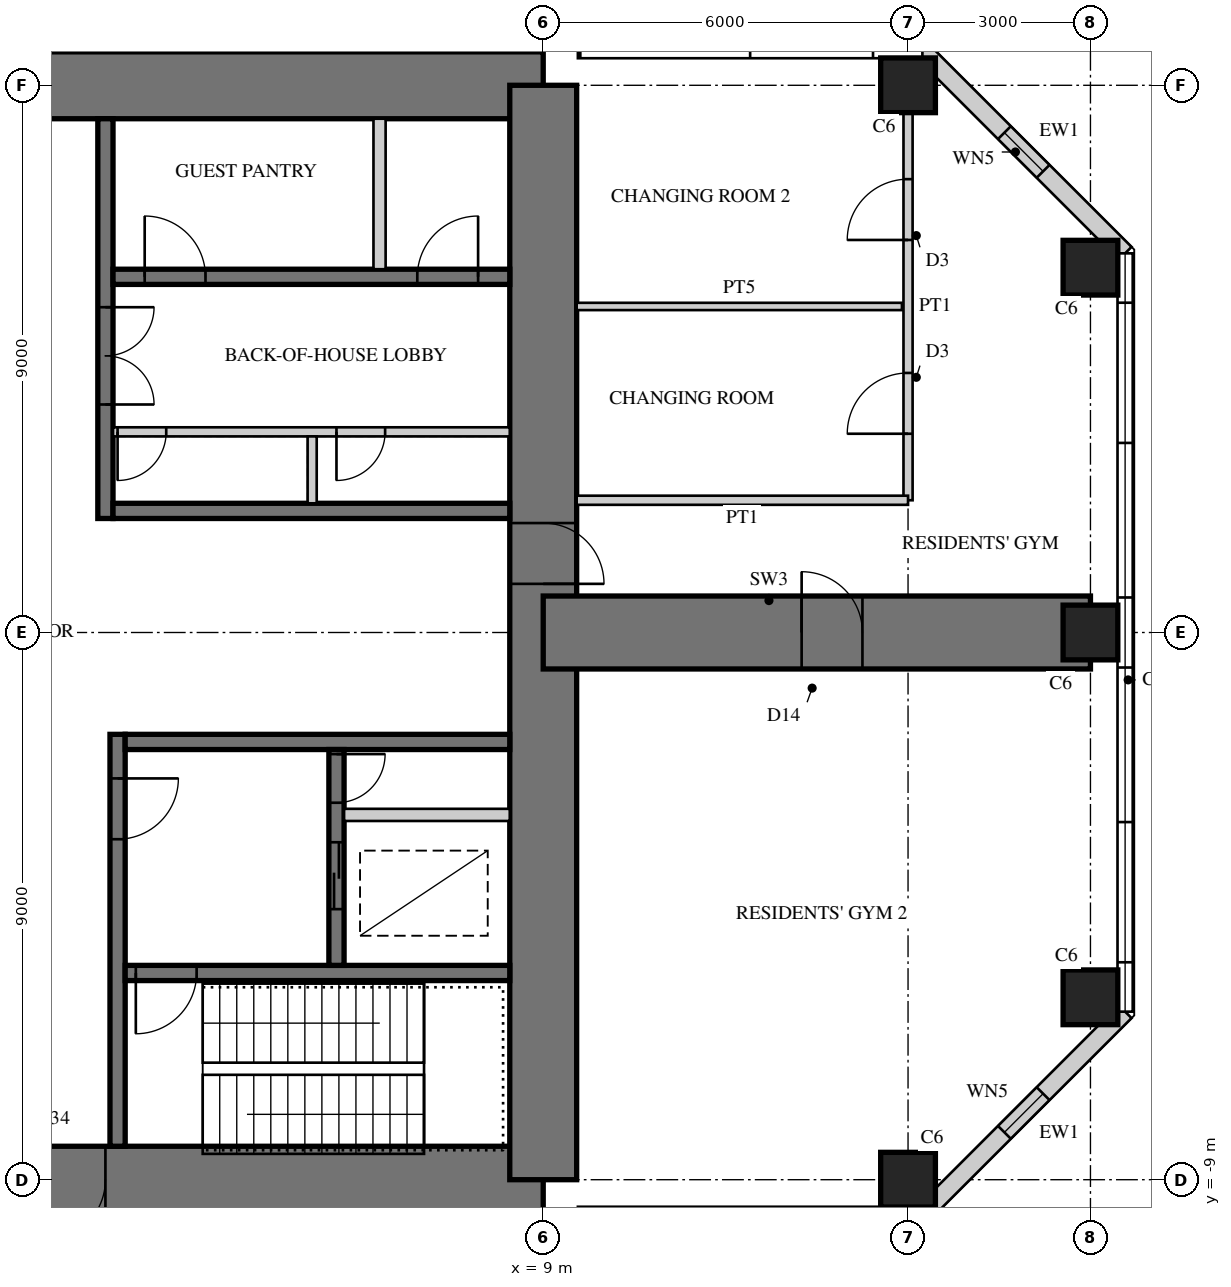
"""IFC4 building model, lengths in metres.
Left out: names, types, materials, properties, quantities, classifications, styles, units other than length and angle.
Written with IfcOpenShell. Run it as: python <this file> out.ifc"""

import sys

from ifc_helpers import new_model, si_unit, direction, frame, frame_2d, origin, origin_2d, place, context, subcontext, project, spatial, rectangle, hollow_rectangle, extrude, element, fill, save


model = new_model("IFC4")
c1 = context("Model", 3, precision=1e-05, world=origin(), true_north=direction((0.0, 1.0)))
c2 = subcontext(c1, "Body", "Model", "MODEL_VIEW")
j1 = project(units=[si_unit("LENGTHUNIT", "METRE"), si_unit("PLANEANGLEUNIT", "RADIAN")], contexts=[c1])
p1 = place(None, origin())
s1 = spatial("IfcSite", under=j1, at=p1, CompositionType="ELEMENT")
p2 = place(p1, origin())
s2 = spatial("IfcBuilding", under=s1, at=p2, CompositionType="ELEMENT")
p3 = place(p2, frame((0.0, 0.0, 217.1)))
s3 = spatial("IfcBuildingStorey", under=s2, at=p3, CompositionType="ELEMENT", Elevation=217.1)
p4 = place(p3, frame((9.0, 9.0, 0.0), z_axis=(0.0, 0.0, 1.0), x_axis=(-1.0, 0.0, 0.0)))
e1 = element("IfcWall", 1, at=p4, inside=s3, PredefinedType="SHEAR", context=c2, shape_type="SweptSolid", body=[
    extrude(rectangle(XDim=18.0, YDim=1.1, at=frame_2d((9.0, 0.0))), origin(), (0.0, 0.0, 1.0), 5.0),
])
p5 = place(p4, frame((9.8, 0.0, 0.0)))
e2 = element("IfcOpeningElement", 2, at=p5, cuts=e1, PredefinedType="OPENING", context=c2, shape_type="SweptSolid", body=[
    extrude(rectangle(XDim=1.0, YDim=2.4, at=frame_2d((0.5, 1.2))), frame((0.0, 0.56, 0.0), z_axis=(0.0, -1.0, 0.0), x_axis=(1.0, 0.0, 0.0)), (0.0, 0.0, 1.0), 1.12),
])
p6 = place(p3, frame((-9.0, -9.0, 0.0), z_axis=(0.0, 0.0, 1.0), x_axis=(1.0, 0.0, 0.0)))
e3 = element("IfcWall", 3, at=p6, inside=s3, PredefinedType="SHEAR", context=c2, shape_type="SweptSolid", body=[
    extrude(rectangle(XDim=18.0, YDim=1.1, at=frame_2d((9.0, 0.0))), origin(), (0.0, 0.0, 1.0), 5.0),
])
p7 = place(p6, frame((9.8, 0.0, 0.0)))
e4 = element("IfcOpeningElement", 4, at=p7, cuts=e3, PredefinedType="OPENING", context=c2, shape_type="SweptSolid", body=[
    extrude(rectangle(XDim=1.0, YDim=2.4, at=frame_2d((0.5, 1.2))), frame((0.0, 0.56, 0.0), z_axis=(0.0, -1.0, 0.0), x_axis=(1.0, 0.0, 0.0)), (0.0, 0.0, 1.0), 1.12),
])
p8 = place(p3, frame((9.0, -9.0, 0.0), z_axis=(0.0, 0.0, 1.0), x_axis=(0.0, 1.0, 0.0)))
e5 = element("IfcWall", 5, at=p8, inside=s3, PredefinedType="SHEAR", context=c2, shape_type="SweptSolid", body=[
    extrude(rectangle(XDim=18.0, YDim=1.1, at=frame_2d((9.0, 0.0))), origin(), (0.0, 0.0, 1.0), 5.0),
])
p9 = place(p8, frame((9.8, 0.0, 0.0)))
e6 = element("IfcOpeningElement", 6, at=p9, cuts=e5, PredefinedType="OPENING", context=c2, shape_type="SweptSolid", body=[
    extrude(rectangle(XDim=1.0, YDim=2.4, at=frame_2d((0.5, 1.2))), frame((0.0, 0.56, 0.0), z_axis=(0.0, -1.0, 0.0), x_axis=(1.0, 0.0, 0.0)), (0.0, 0.0, 1.0), 1.12),
])
p10 = place(p3, frame((1.8, 1.875, 0.0), z_axis=(0.0, 0.0, 1.0), x_axis=(0.0, 1.0, 0.0)))
e7 = element("IfcWall", 7, at=p10, inside=s3, PredefinedType="SHEAR", context=c2, shape_type="SweptSolid", body=[
    extrude(rectangle(XDim=6.575, YDim=0.25, at=frame_2d((3.288, 0.0))), origin(), (0.0, 0.0, 1.0), 5.0),
])
p11 = place(p10, frame((1.875, 0.0, 0.0)))
e8 = element("IfcOpeningElement", 8, at=p11, cuts=e7, PredefinedType="OPENING", context=c2, shape_type="SweptSolid", body=[
    extrude(rectangle(XDim=1.6, YDim=2.4, at=frame_2d((0.8, 1.2))), frame((0.0, 0.135, 0.0), z_axis=(0.0, -1.0, 0.0), x_axis=(1.0, 0.0, 0.0)), (0.0, 0.0, 1.0), 0.27),
])
p12 = place(p3, frame((1.925, 2.0, 0.0), z_axis=(0.0, 0.0, 1.0), x_axis=(1.0, 0.0, 0.0)))
e9 = element("IfcWall", 9, at=p12, inside=s3, PredefinedType="SHEAR", context=c2, shape_type="SweptSolid", body=[
    extrude(rectangle(XDim=6.525, YDim=0.25, at=frame_2d((3.262, 0.0))), origin(), (0.0, 0.0, 1.0), 5.0),
])
p13 = place(p3, frame((1.925, 5.85, 0.0), z_axis=(0.0, 0.0, 1.0), x_axis=(1.0, 0.0, 0.0)))
e10 = element("IfcWall", 10, at=p13, inside=s3, PredefinedType="SHEAR", context=c2, shape_type="SweptSolid", body=[
    extrude(rectangle(XDim=6.525, YDim=0.25, at=frame_2d((3.262, 0.0))), origin(), (0.0, 0.0, 1.0), 5.0),
])
p14 = place(p13, frame((0.521, 0.0, 0.0)))
e11 = element("IfcOpeningElement", 11, at=p14, cuts=e10, PredefinedType="OPENING", context=c2, shape_type="SweptSolid", body=[
    extrude(rectangle(XDim=1.0, YDim=2.1, at=frame_2d((0.5, 1.05))), frame((0.0, 0.135, 0.0), z_axis=(0.0, -1.0, 0.0), x_axis=(1.0, 0.0, 0.0)), (0.0, 0.0, 1.0), 0.27),
])
p15 = place(p13, frame((5.004, 0.0, 0.0)))
e12 = element("IfcOpeningElement", 12, at=p15, cuts=e10, PredefinedType="OPENING", context=c2, shape_type="SweptSolid", body=[
    extrude(rectangle(XDim=1.0, YDim=2.1, at=frame_2d((0.5, 1.05))), frame((0.0, 0.135, 0.0), z_axis=(0.0, -1.0, 0.0), x_axis=(1.0, 0.0, 0.0)), (0.0, 0.0, 1.0), 0.27),
])
p16 = place(p3, frame((1.925, 3.3, 0.0), z_axis=(0.0, 0.0, 1.0), x_axis=(1.0, 0.0, 0.0)))
e13 = element("IfcWall", 13, at=p16, inside=s3, PredefinedType="PARTITIONING", context=c2, shape_type="SweptSolid", body=[
    extrude(rectangle(XDim=6.525, YDim=0.15, at=frame_2d((3.262, 0.0))), origin(), (0.0, 0.0, 1.0), 5.0),
])
p17 = place(p16, frame((0.075, 0.0, 0.0)))
e14 = element("IfcOpeningElement", 14, at=p17, cuts=e13, PredefinedType="OPENING", context=c2, shape_type="SweptSolid", body=[
    extrude(rectangle(XDim=0.8, YDim=2.1, at=frame_2d((0.4, 1.05))), frame((0.0, 0.085, 0.0), z_axis=(0.0, -1.0, 0.0), x_axis=(1.0, 0.0, 0.0)), (0.0, 0.0, 1.0), 0.17),
])
p18 = place(p16, frame((3.675, 0.0, 0.0)))
e15 = element("IfcOpeningElement", 15, at=p18, cuts=e13, PredefinedType="OPENING", context=c2, shape_type="SweptSolid", body=[
    extrude(rectangle(XDim=0.8, YDim=2.1, at=frame_2d((0.4, 1.05))), frame((0.0, 0.085, 0.0), z_axis=(0.0, -1.0, 0.0), x_axis=(1.0, 0.0, 0.0)), (0.0, 0.0, 1.0), 0.17),
])
p19 = place(p3, frame((5.2, 2.125, 0.0), z_axis=(0.0, 0.0, 1.0), x_axis=(0.0, 1.0, 0.0)))
e16 = element("IfcWall", 16, at=p19, inside=s3, PredefinedType="PARTITIONING", context=c2, shape_type="SweptSolid", body=[
    extrude(rectangle(XDim=1.1, YDim=0.15, at=frame_2d((0.55, 0.0))), origin(), (0.0, 0.0, 1.0), 5.0),
])
p20 = place(p3, frame((6.308, 5.975, 0.0), z_axis=(0.0, 0.0, 1.0), x_axis=(0.0, 1.0, 0.0)))
e17 = element("IfcWall", 17, at=p20, inside=s3, PredefinedType="PARTITIONING", context=c2, shape_type="SweptSolid", body=[
    extrude(rectangle(XDim=2.475, YDim=0.2, at=frame_2d((1.237, 0.0))), origin(), (0.0, 0.0, 1.0), 5.0),
])
p21 = place(p3, frame((2.0, -1.675, 0.0), z_axis=(0.0, 0.0, 1.0), x_axis=(0.0, -1.0, 0.0)))
e18 = element("IfcWall", 18, at=p21, inside=s3, PredefinedType="SHEAR", context=c2, shape_type="SweptSolid", body=[
    extrude(rectangle(XDim=6.775, YDim=0.25, at=frame_2d((3.387, 0.0))), origin(), (0.0, 0.0, 1.0), 5.0),
])
p22 = place(p21, frame((0.725, 0.0, 0.0)))
e19 = element("IfcOpeningElement", 19, at=p22, cuts=e18, PredefinedType="OPENING", context=c2, shape_type="SweptSolid", body=[
    extrude(rectangle(XDim=1.0, YDim=2.1, at=frame_2d((0.5, 1.05))), frame((0.0, 0.135, 0.0), z_axis=(0.0, -1.0, 0.0), x_axis=(1.0, 0.0, 0.0)), (0.0, 0.0, 1.0), 0.27),
])
p23 = place(p3, frame((2.125, -1.8, 0.0), z_axis=(0.0, 0.0, 1.0), x_axis=(1.0, 0.0, 0.0)))
e20 = element("IfcWall", 20, at=p23, inside=s3, PredefinedType="SHEAR", context=c2, shape_type="SweptSolid", body=[
    extrude(rectangle(XDim=6.325, YDim=0.25, at=frame_2d((3.163, 0.0))), origin(), (0.0, 0.0, 1.0), 5.0),
])
p24 = place(p3, frame((2.125, -5.6, 0.0), z_axis=(0.0, 0.0, 1.0), x_axis=(1.0, 0.0, 0.0)))
e21 = element("IfcWall", 21, at=p24, inside=s3, PredefinedType="SHEAR", context=c2, shape_type="SweptSolid", body=[
    extrude(rectangle(XDim=6.325, YDim=0.25, at=frame_2d((3.163, 0.0))), origin(), (0.0, 0.0, 1.0), 5.0),
])
p25 = place(p24, frame((0.175, 0.0, 0.0)))
e22 = element("IfcOpeningElement", 22, at=p25, cuts=e21, PredefinedType="OPENING", context=c2, shape_type="SweptSolid", body=[
    extrude(rectangle(XDim=1.0, YDim=2.1, at=frame_2d((0.5, 1.05))), frame((0.0, 0.135, 0.0), z_axis=(0.0, -1.0, 0.0), x_axis=(1.0, 0.0, 0.0)), (0.0, 0.0, 1.0), 0.27),
])
p26 = place(p3, frame((5.6, -1.925, 0.0), z_axis=(0.0, 0.0, 1.0), x_axis=(0.0, -1.0, 0.0)))
e23 = element("IfcWall", 23, at=p26, inside=s3, PredefinedType="SHEAR", context=c2, shape_type="SweptSolid", body=[
    extrude(rectangle(XDim=3.55, YDim=0.25, at=frame_2d((1.775, 0.0))), origin(), (0.0, 0.0, 1.0), 5.0),
])
p27 = place(p26, frame((1.525, 0.0, 0.0)))
e24 = element("IfcOpeningElement", 24, at=p27, cuts=e23, PredefinedType="OPENING", context=c2, shape_type="SweptSolid", body=[
    extrude(rectangle(XDim=1.1, YDim=2.2, at=frame_2d((0.55, 1.1))), frame((0.0, 0.135, 0.0), z_axis=(0.0, -1.0, 0.0), x_axis=(1.0, 0.0, 0.0)), (0.0, 0.0, 1.0), 0.27),
])
p28 = place(p26, frame((0.075, 0.0, 0.0)))
e25 = element("IfcOpeningElement", 25, at=p28, cuts=e23, PredefinedType="OPENING", context=c2, shape_type="SweptSolid", body=[
    extrude(rectangle(XDim=0.8, YDim=2.1, at=frame_2d((0.4, 1.05))), frame((0.0, 0.135, 0.0), z_axis=(0.0, -1.0, 0.0), x_axis=(1.0, 0.0, 0.0)), (0.0, 0.0, 1.0), 0.27),
])
p29 = place(p3, frame((5.725, -3.0, 0.0), z_axis=(0.0, 0.0, 1.0), x_axis=(1.0, 0.0, 0.0)))
e26 = element("IfcWall", 26, at=p29, inside=s3, PredefinedType="PARTITIONING", context=c2, shape_type="SweptSolid", body=[
    extrude(rectangle(XDim=2.725, YDim=0.2, at=frame_2d((1.362, 0.0))), origin(), (0.0, 0.0, 1.0), 5.0),
])
p30 = place(p3, frame((9.0, 0.0, 0.0), z_axis=(0.0, 0.0, 1.0), x_axis=(1.0, 0.0, 0.0)))
e27 = element("IfcWall", 27, at=p30, inside=s3, PredefinedType="SHEAR", context=c2, shape_type="SweptSolid", body=[
    extrude(rectangle(XDim=9.0, YDim=1.2, at=frame_2d((4.5, 0.0))), origin(), (0.0, 0.0, 1.0), 5.0),
])
p31 = place(p30, frame((4.25, 0.0, 0.0)))
e28 = element("IfcOpeningElement", 28, at=p31, cuts=e27, PredefinedType="OPENING", context=c2, shape_type="SweptSolid", body=[
    extrude(rectangle(XDim=1.0, YDim=2.2, at=frame_2d((0.5, 1.1))), frame((0.0, 0.61, 0.0), z_axis=(0.0, -1.0, 0.0), x_axis=(1.0, 0.0, 0.0)), (0.0, 0.0, 1.0), 1.22),
])
for number, where, z_axis, x_axis in (
    (29, (15.0, -9.0, 0.0), (0.0, 0.0, 1.0), (1.0, 0.0, 0.0)),
    (30, (15.0, 9.0, 0.0), (0.0, 0.0, 1.0), (1.0, 0.0, 0.0)),
    (31, (18.0, -6.0, 0.0), (0.0, 0.0, 1.0), (1.0, 0.0, 0.0)),
    (32, (18.0, 0.0, 0.0), (0.0, 0.0, 1.0), (1.0, 0.0, 0.0)),
    (33, (18.0, 6.0, 0.0), (0.0, 0.0, 1.0), (1.0, 0.0, 0.0)),
):
    element("IfcColumn", number, at=place(p3, frame(where, z_axis=z_axis, x_axis=x_axis)), inside=s3, PredefinedType="COLUMN", context=c2, shape_type="SweptSolid", body=[
        extrude(rectangle(XDim=0.9, YDim=0.9, at=origin_2d()), origin(), (0.0, 0.0, 1.0), 5.0),
    ])
p32 = place(p3, frame((15.236, -9.57, 0.0), z_axis=(0.0, 0.0, 1.0), x_axis=(0.707106781187, 0.707106781187, 0.0)))
e34 = element("IfcWall", 34, at=p32, inside=s3, PredefinedType="SOLIDWALL", context=c2, shape_type="SweptSolid", body=[
    extrude(rectangle(XDim=4.715, YDim=0.3, at=frame_2d((2.357, 0.0))), origin(), (0.0, 0.0, 1.0), 4.82),
])
p33 = place(p32, frame((1.907, 0.0, 0.3)))
e35 = element("IfcOpeningElement", 35, at=p33, cuts=e34, PredefinedType="OPENING", context=c2, shape_type="SweptSolid", body=[
    extrude(rectangle(XDim=0.9, YDim=2.4, at=frame_2d((0.45, 1.2))), frame((0.0, 0.16, 0.0), z_axis=(0.0, -1.0, 0.0), x_axis=(1.0, 0.0, 0.0)), (0.0, 0.0, 1.0), 0.32),
])
p34 = place(p3, frame((18.57, 6.236, 0.0), z_axis=(0.0, 0.0, 1.0), x_axis=(-0.707106781187, 0.707106781187, 0.0)))
e36 = element("IfcWall", 36, at=p34, inside=s3, PredefinedType="SOLIDWALL", context=c2, shape_type="SweptSolid", body=[
    extrude(rectangle(XDim=4.715, YDim=0.3, at=frame_2d((2.357, 0.0))), origin(), (0.0, 0.0, 1.0), 4.82),
])
p35 = place(p34, frame((1.907, 0.0, 0.3)))
e37 = element("IfcOpeningElement", 37, at=p35, cuts=e36, PredefinedType="OPENING", context=c2, shape_type="SweptSolid", body=[
    extrude(rectangle(XDim=0.9, YDim=2.4, at=frame_2d((0.45, 1.2))), frame((0.0, 0.16, 0.0), z_axis=(0.0, -1.0, 0.0), x_axis=(1.0, 0.0, 0.0)), (0.0, 0.0, 1.0), 0.32),
])
p36 = place(p3, frame((15.0, 2.175, 0.0), z_axis=(0.0, 0.0, 1.0), x_axis=(0.0, 1.0, 0.0)))
e38 = element("IfcWall", 38, at=p36, inside=s3, PredefinedType="PARTITIONING", context=c2, shape_type="SweptSolid", body=[
    extrude(rectangle(XDim=6.375, YDim=0.15, at=frame_2d((3.188, 0.0))), origin(), (0.0, 0.0, 1.0), 4.07),
])
p37 = place(p36, frame((1.094, 0.0, 0.0)))
e39 = element("IfcOpeningElement", 39, at=p37, cuts=e38, PredefinedType="OPENING", context=c2, shape_type="SweptSolid", body=[
    extrude(rectangle(XDim=1.0, YDim=2.1, at=frame_2d((0.5, 1.05))), frame((0.0, 0.085, 0.0), z_axis=(0.0, -1.0, 0.0), x_axis=(1.0, 0.0, 0.0)), (0.0, 0.0, 1.0), 0.17),
])
p38 = place(p36, frame((4.281, 0.0, 0.0)))
e40 = element("IfcOpeningElement", 40, at=p38, cuts=e38, PredefinedType="OPENING", context=c2, shape_type="SweptSolid", body=[
    extrude(rectangle(XDim=1.0, YDim=2.1, at=frame_2d((0.5, 1.05))), frame((0.0, 0.085, 0.0), z_axis=(0.0, -1.0, 0.0), x_axis=(1.0, 0.0, 0.0)), (0.0, 0.0, 1.0), 0.17),
])
p39 = place(p3, frame((9.55, 2.175, 0.0), z_axis=(0.0, 0.0, 1.0), x_axis=(1.0, 0.0, 0.0)))
e41 = element("IfcWall", 41, at=p39, inside=s3, PredefinedType="PARTITIONING", context=c2, shape_type="SweptSolid", body=[
    extrude(rectangle(XDim=5.45, YDim=0.15, at=frame_2d((2.725, 0.0))), origin(), (0.0, 0.0, 1.0), 4.82),
])
p40 = place(p3, frame((9.55, 5.363, 0.0), z_axis=(0.0, 0.0, 1.0), x_axis=(1.0, 0.0, 0.0)))
e42 = element("IfcWall", 42, at=p40, inside=s3, PredefinedType="PLUMBINGWALL", context=c2, shape_type="SweptSolid", body=[
    extrude(rectangle(XDim=5.35, YDim=0.12, at=frame_2d((2.675, 0.0))), origin(), (0.0, 0.0, 1.0), 4.82),
])
p41 = place(p33, origin())
e43 = element("IfcWindow", 43, at=p41, inside=s3, PartitioningType="SINGLE_PANEL", PredefinedType="WINDOW", context=c2, shape_type="SweptSolid", body=[
    extrude(hollow_rectangle(XDim=0.9, YDim=2.4, WallThickness=0.06, at=frame_2d((0.45, 1.2))), frame((0.0, 0.03, 0.0), z_axis=(0.0, -1.0, 0.0), x_axis=(1.0, 0.0, 0.0)), (0.0, 0.0, 1.0), 0.06),
    extrude(rectangle(XDim=0.779, YDim=2.279, at=frame_2d((0.45, 1.2))), frame((0.0, 0.03, 0.0), z_axis=(0.0, -1.0, 0.0), x_axis=(1.0, 0.0, 0.0)), (0.0, 0.0, 1.0), 0.06),
])
fill(e35, e43)
p42 = place(p35, origin())
e44 = element("IfcWindow", 44, at=p42, inside=s3, PartitioningType="SINGLE_PANEL", PredefinedType="WINDOW", context=c2, shape_type="SweptSolid", body=[
    extrude(hollow_rectangle(XDim=0.9, YDim=2.4, WallThickness=0.06, at=frame_2d((0.45, 1.2))), frame((0.0, 0.03, 0.0), z_axis=(0.0, -1.0, 0.0), x_axis=(1.0, 0.0, 0.0)), (0.0, 0.0, 1.0), 0.06),
    extrude(rectangle(XDim=0.779, YDim=2.279, at=frame_2d((0.45, 1.2))), frame((0.0, 0.03, 0.0), z_axis=(0.0, -1.0, 0.0), x_axis=(1.0, 0.0, 0.0)), (0.0, 0.0, 1.0), 0.06),
])
fill(e37, e44)
p43 = place(p37, origin())
e45 = element("IfcDoor", 45, at=p43, inside=s3, OperationType="SINGLE_SWING_LEFT", PredefinedType="DOOR", context=c2, shape_type="SweptSolid", body=[
    extrude(rectangle(XDim=1.0, YDim=2.1, at=frame_2d((0.5, 1.05))), frame((0.0, 0.025, 0.0), z_axis=(0.0, -1.0, 0.0), x_axis=(1.0, 0.0, 0.0)), (0.0, 0.0, 1.0), 0.05),
])
fill(e39, e45)
p44 = place(p38, origin())
e46 = element("IfcDoor", 46, at=p44, inside=s3, OperationType="SINGLE_SWING_LEFT", PredefinedType="DOOR", context=c2, shape_type="SweptSolid", body=[
    extrude(rectangle(XDim=1.0, YDim=2.1, at=frame_2d((0.5, 1.05))), frame((0.0, 0.025, 0.0), z_axis=(0.0, -1.0, 0.0), x_axis=(1.0, 0.0, 0.0)), (0.0, 0.0, 1.0), 0.05),
])
fill(e40, e46)
p45 = place(p31, origin())
e47 = element("IfcDoor", 47, at=p45, inside=s3, OperationType="SINGLE_SWING_LEFT", PredefinedType="DOOR", context=c2, shape_type="SweptSolid", body=[
    extrude(rectangle(XDim=1.0, YDim=2.2, at=frame_2d((0.5, 1.1))), frame((0.0, 0.025, 0.0), z_axis=(0.0, -1.0, 0.0), x_axis=(1.0, 0.0, 0.0)), (0.0, 0.0, 1.0), 0.05),
])
fill(e28, e47)
p46 = place(p7, frame((1.0, 0.0, 0.0), z_axis=(0.0, 0.0, 1.0), x_axis=(-1.0, 0.0, 0.0)))
e48 = element("IfcDoor", 48, at=p46, inside=s3, OperationType="SINGLE_SWING_RIGHT", PredefinedType="DOOR", context=c2, shape_type="SweptSolid", body=[
    extrude(rectangle(XDim=1.0, YDim=2.4, at=frame_2d((0.5, 1.2))), frame((0.0, -0.005, 0.0), z_axis=(0.0, -1.0, 0.0), x_axis=(1.0, 0.0, 0.0)), (0.0, 0.0, 1.0), 0.05),
])
fill(e4, e48)
p47 = place(p9, frame((1.0, 0.0, 0.0), z_axis=(0.0, 0.0, 1.0), x_axis=(-1.0, 0.0, 0.0)))
e49 = element("IfcDoor", 49, at=p47, inside=s3, OperationType="SINGLE_SWING_RIGHT", PredefinedType="DOOR", context=c2, shape_type="SweptSolid", body=[
    extrude(rectangle(XDim=1.0, YDim=2.4, at=frame_2d((0.5, 1.2))), frame((0.0, -0.005, 0.0), z_axis=(0.0, -1.0, 0.0), x_axis=(1.0, 0.0, 0.0)), (0.0, 0.0, 1.0), 0.05),
])
fill(e6, e49)
p48 = place(p11, frame((1.6, 0.0, 0.0), z_axis=(0.0, 0.0, 1.0), x_axis=(-1.0, 0.0, 0.0)))
e50 = element("IfcDoor", 50, at=p48, inside=s3, OperationType="DOUBLE_DOOR_SINGLE_SWING", PredefinedType="DOOR", context=c2, shape_type="SweptSolid", body=[
    extrude(rectangle(XDim=1.6, YDim=2.4, at=frame_2d((0.8, 1.2))), frame((0.0, 0.025, 0.0), z_axis=(0.0, -1.0, 0.0), x_axis=(1.0, 0.0, 0.0)), (0.0, 0.0, 1.0), 0.05),
])
fill(e8, e50)
p49 = place(p17, frame((0.8, 0.0, 0.0), z_axis=(0.0, 0.0, 1.0), x_axis=(-1.0, 0.0, 0.0)))
e51 = element("IfcDoor", 51, at=p49, inside=s3, OperationType="SINGLE_SWING_RIGHT", PredefinedType="DOOR", context=c2, shape_type="SweptSolid", body=[
    extrude(rectangle(XDim=0.8, YDim=2.1, at=frame_2d((0.4, 1.05))), frame((0.0, 0.025, 0.0), z_axis=(0.0, -1.0, 0.0), x_axis=(1.0, 0.0, 0.0)), (0.0, 0.0, 1.0), 0.05),
])
fill(e14, e51)
p50 = place(p18, frame((0.8, 0.0, 0.0), z_axis=(0.0, 0.0, 1.0), x_axis=(-1.0, 0.0, 0.0)))
e52 = element("IfcDoor", 52, at=p50, inside=s3, OperationType="SINGLE_SWING_RIGHT", PredefinedType="DOOR", context=c2, shape_type="SweptSolid", body=[
    extrude(rectangle(XDim=0.8, YDim=2.1, at=frame_2d((0.4, 1.05))), frame((0.0, 0.025, 0.0), z_axis=(0.0, -1.0, 0.0), x_axis=(1.0, 0.0, 0.0)), (0.0, 0.0, 1.0), 0.05),
])
fill(e15, e52)
p51 = place(p22, origin())
e53 = element("IfcDoor", 53, at=p51, inside=s3, OperationType="SINGLE_SWING_LEFT", PredefinedType="DOOR", context=c2, shape_type="SweptSolid", body=[
    extrude(rectangle(XDim=1.0, YDim=2.1, at=frame_2d((0.5, 1.05))), frame((0.0, 0.025, 0.0), z_axis=(0.0, -1.0, 0.0), x_axis=(1.0, 0.0, 0.0)), (0.0, 0.0, 1.0), 0.05),
])
fill(e19, e53)
p52 = place(p25, frame((1.0, 0.0, 0.0), z_axis=(0.0, 0.0, 1.0), x_axis=(-1.0, 0.0, 0.0)))
e54 = element("IfcDoor", 54, at=p52, inside=s3, OperationType="SINGLE_SWING_RIGHT", PredefinedType="DOOR", context=c2, shape_type="SweptSolid", body=[
    extrude(rectangle(XDim=1.0, YDim=2.1, at=frame_2d((0.5, 1.05))), frame((0.0, 0.025, 0.0), z_axis=(0.0, -1.0, 0.0), x_axis=(1.0, 0.0, 0.0)), (0.0, 0.0, 1.0), 0.05),
])
fill(e22, e54)
p53 = place(p27, origin())
e55 = element("IfcDoor", 55, at=p53, inside=s3, OperationType="DOUBLE_DOOR_SLIDING", PredefinedType="DOOR", context=c2, shape_type="SweptSolid", body=[
    extrude(rectangle(XDim=1.1, YDim=2.2, at=frame_2d((0.55, 1.1))), frame((0.0, 0.025, 0.0), z_axis=(0.0, -1.0, 0.0), x_axis=(1.0, 0.0, 0.0)), (0.0, 0.0, 1.0), 0.05),
])
fill(e24, e55)
p54 = place(p28, origin())
e56 = element("IfcDoor", 56, at=p54, inside=s3, OperationType="SINGLE_SWING_LEFT", PredefinedType="DOOR", context=c2, shape_type="SweptSolid", body=[
    extrude(rectangle(XDim=0.8, YDim=2.1, at=frame_2d((0.4, 1.05))), frame((0.0, 0.025, 0.0), z_axis=(0.0, -1.0, 0.0), x_axis=(1.0, 0.0, 0.0)), (0.0, 0.0, 1.0), 0.05),
])
fill(e25, e56)
p55 = place(p14, origin())
e57 = element("IfcDoor", 57, at=p55, inside=s3, OperationType="SINGLE_SWING_LEFT", PredefinedType="DOOR", context=c2, shape_type="SweptSolid", body=[
    extrude(rectangle(XDim=1.0, YDim=2.1, at=frame_2d((0.5, 1.05))), frame((0.0, 0.025, 0.0), z_axis=(0.0, -1.0, 0.0), x_axis=(1.0, 0.0, 0.0)), (0.0, 0.0, 1.0), 0.05),
])
fill(e11, e57)
p56 = place(p15, origin())
e58 = element("IfcDoor", 58, at=p56, inside=s3, OperationType="SINGLE_SWING_RIGHT", PredefinedType="DOOR", context=c2, shape_type="SweptSolid", body=[
    extrude(rectangle(XDim=1.0, YDim=2.1, at=frame_2d((0.5, 1.05))), frame((0.0, 0.025, 0.0), z_axis=(0.0, -1.0, 0.0), x_axis=(1.0, 0.0, 0.0)), (0.0, 0.0, 1.0), 0.05),
])
fill(e12, e58)
save(model, sys.argv[1])
